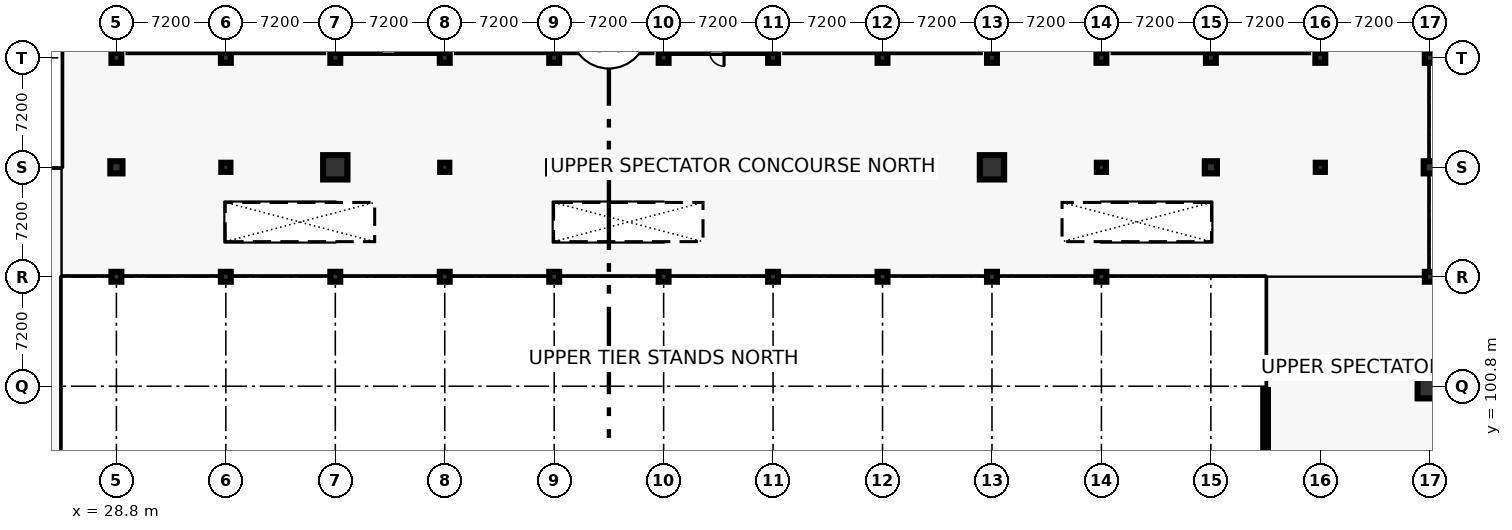
"""IFC4 building model, lengths in metres.
Left out: names, types, materials, properties, quantities, classifications, styles, units other than length and angle.
Written with IfcOpenShell. Run it as: python <this file> out.ifc"""

import sys

from ifc_helpers import new_model, si_unit, direction, frame, frame_2d, origin, origin_2d, place, context, subcontext, project, spatial, rectangle, circle, extrude, element, fill, save


model = new_model("IFC4")
c1 = context("Model", 3, precision=1e-05, world=origin(), true_north=direction((0.0, 1.0)))
c2 = subcontext(c1, "Body", "Model", "MODEL_VIEW")
j1 = project(units=[si_unit("LENGTHUNIT", "METRE"), si_unit("PLANEANGLEUNIT", "RADIAN")], contexts=[c1])
p1 = place(None, origin())
s1 = spatial("IfcSite", under=j1, at=p1, CompositionType="ELEMENT")
p2 = place(p1, origin())
s2 = spatial("IfcBuilding", under=s1, at=p2, CompositionType="ELEMENT")
p3 = place(p2, frame((0.0, 0.0, 13.8)))
s3 = spatial("IfcBuildingStorey", under=s2, at=p3, CompositionType="ELEMENT", Elevation=13.8)
p4 = place(p3, frame((28.8, 108.0, 0.0), z_axis=(0.0, 0.0, 1.0), x_axis=(1.0, 0.0, 0.0)))
e1 = element("IfcColumn", 1, at=p4, inside=s3, PredefinedType="COLUMN", context=c2, shape_type="SweptSolid", body=[
    extrude(rectangle(XDim=0.65, YDim=0.65, at=origin_2d()), origin(), (0.0, 0.0, 1.0), 4.8),
])
p5 = place(p3, frame((28.8, 115.2, 0.0), z_axis=(0.0, 0.0, 1.0), x_axis=(1.0, 0.0, 0.0)))
e2 = element("IfcColumn", 2, at=p5, inside=s3, PredefinedType="COLUMN", context=c2, shape_type="SweptSolid", body=[
    extrude(circle(Radius=0.4, at=origin_2d()), origin(), (0.0, 0.0, 1.0), 4.8),
])
for number, where, z_axis, x_axis in (
    (3, (28.8, 122.4, 0.0), (0.0, 0.0, 1.0), (1.0, 0.0, 0.0)),
    (4, (36.0, 108.0, 0.0), (0.0, 0.0, 1.0), (1.0, 0.0, 0.0)),
):
    element("IfcColumn", number, at=place(p3, frame(where, z_axis=z_axis, x_axis=x_axis)), inside=s3, PredefinedType="COLUMN", context=c2, shape_type="SweptSolid", body=[
        extrude(rectangle(XDim=0.65, YDim=0.65, at=origin_2d()), origin(), (0.0, 0.0, 1.0), 4.8),
    ])
p6 = place(p3, frame((36.0, 115.2, 0.0), z_axis=(0.0, 0.0, 1.0), x_axis=(1.0, 0.0, 0.0)))
e5 = element("IfcColumn", 5, at=p6, inside=s3, PredefinedType="COLUMN", context=c2, shape_type="SweptSolid", body=[
    extrude(rectangle(XDim=0.6, YDim=0.6, at=origin_2d()), origin(), (0.0, 0.0, 1.0), 4.8),
])
for number, where, z_axis, x_axis in (
    (6, (36.0, 122.4, 0.0), (0.0, 0.0, 1.0), (1.0, 0.0, 0.0)),
    (7, (43.2, 108.0, 0.0), (0.0, 0.0, 1.0), (1.0, 0.0, 0.0)),
):
    element("IfcColumn", number, at=place(p3, frame(where, z_axis=z_axis, x_axis=x_axis)), inside=s3, PredefinedType="COLUMN", context=c2, shape_type="SweptSolid", body=[
        extrude(rectangle(XDim=0.65, YDim=0.65, at=origin_2d()), origin(), (0.0, 0.0, 1.0), 4.8),
    ])
p7 = place(p3, frame((43.2, 115.2, 0.0), z_axis=(0.0, 0.0, 1.0), x_axis=(1.0, 0.0, 0.0)))
e8 = element("IfcColumn", 8, at=p7, inside=s3, PredefinedType="COLUMN", context=c2, shape_type="SweptSolid", body=[
    extrude(circle(Radius=0.8, at=origin_2d()), origin(), (0.0, 0.0, 1.0), 4.8),
])
for number, where, z_axis, x_axis in (
    (9, (43.2, 122.4, 0.0), (0.0, 0.0, 1.0), (1.0, 0.0, 0.0)),
    (10, (50.4, 108.0, 0.0), (0.0, 0.0, 1.0), (1.0, 0.0, 0.0)),
):
    element("IfcColumn", number, at=place(p3, frame(where, z_axis=z_axis, x_axis=x_axis)), inside=s3, PredefinedType="COLUMN", context=c2, shape_type="SweptSolid", body=[
        extrude(rectangle(XDim=0.65, YDim=0.65, at=origin_2d()), origin(), (0.0, 0.0, 1.0), 4.8),
    ])
p8 = place(p3, frame((50.4, 115.2, 0.0), z_axis=(0.0, 0.0, 1.0), x_axis=(1.0, 0.0, 0.0)))
e11 = element("IfcColumn", 11, at=p8, inside=s3, PredefinedType="COLUMN", context=c2, shape_type="SweptSolid", body=[
    extrude(rectangle(XDim=0.6, YDim=0.6, at=origin_2d()), origin(), (0.0, 0.0, 1.0), 4.8),
])
for number, where, z_axis, x_axis in (
    (12, (50.4, 122.4, 0.0), (0.0, 0.0, 1.0), (1.0, 0.0, 0.0)),
    (13, (57.6, 108.0, 0.0), (0.0, 0.0, 1.0), (1.0, 0.0, 0.0)),
):
    element("IfcColumn", number, at=place(p3, frame(where, z_axis=z_axis, x_axis=x_axis)), inside=s3, PredefinedType="COLUMN", context=c2, shape_type="SweptSolid", body=[
        extrude(rectangle(XDim=0.65, YDim=0.65, at=origin_2d()), origin(), (0.0, 0.0, 1.0), 4.8),
    ])
p9 = place(p3, frame((57.6, 115.2, 0.0), z_axis=(0.0, 0.0, 1.0), x_axis=(1.0, 0.0, 0.0)))
e14 = element("IfcColumn", 14, at=p9, inside=s3, PredefinedType="COLUMN", context=c2, shape_type="SweptSolid", body=[
    extrude(circle(Radius=0.4, at=origin_2d()), origin(), (0.0, 0.0, 1.0), 4.8),
])
for number, where, z_axis, x_axis in (
    (15, (57.6, 122.4, 0.0), (0.0, 0.0, 1.0), (1.0, 0.0, 0.0)),
    (16, (64.8, 108.0, 0.0), (0.0, 0.0, 1.0), (1.0, 0.0, 0.0)),
):
    element("IfcColumn", number, at=place(p3, frame(where, z_axis=z_axis, x_axis=x_axis)), inside=s3, PredefinedType="COLUMN", context=c2, shape_type="SweptSolid", body=[
        extrude(rectangle(XDim=0.65, YDim=0.65, at=origin_2d()), origin(), (0.0, 0.0, 1.0), 4.8),
    ])
p10 = place(p3, frame((64.8, 115.2, 0.0), z_axis=(0.0, 0.0, 1.0), x_axis=(1.0, 0.0, 0.0)))
e17 = element("IfcColumn", 17, at=p10, inside=s3, PredefinedType="COLUMN", context=c2, shape_type="SweptSolid", body=[
    extrude(rectangle(XDim=0.6, YDim=0.6, at=origin_2d()), origin(), (0.0, 0.0, 1.0), 4.8),
])
for number, where, z_axis, x_axis in (
    (18, (64.8, 122.4, 0.0), (0.0, 0.0, 1.0), (1.0, 0.0, 0.0)),
    (19, (72.0, 108.0, 0.0), (0.0, 0.0, 1.0), (1.0, 0.0, 0.0)),
):
    element("IfcColumn", number, at=place(p3, frame(where, z_axis=z_axis, x_axis=x_axis)), inside=s3, PredefinedType="COLUMN", context=c2, shape_type="SweptSolid", body=[
        extrude(rectangle(XDim=0.65, YDim=0.65, at=origin_2d()), origin(), (0.0, 0.0, 1.0), 4.8),
    ])
p11 = place(p3, frame((72.0, 115.2, 0.0), z_axis=(0.0, 0.0, 1.0), x_axis=(1.0, 0.0, 0.0)))
e20 = element("IfcColumn", 20, at=p11, inside=s3, PredefinedType="COLUMN", context=c2, shape_type="SweptSolid", body=[
    extrude(circle(Radius=0.4, at=origin_2d()), origin(), (0.0, 0.0, 1.0), 4.8),
])
for number, where, z_axis, x_axis in (
    (21, (72.0, 122.4, 0.0), (0.0, 0.0, 1.0), (1.0, 0.0, 0.0)),
    (22, (79.2, 108.0, 0.0), (0.0, 0.0, 1.0), (1.0, 0.0, 0.0)),
):
    element("IfcColumn", number, at=place(p3, frame(where, z_axis=z_axis, x_axis=x_axis)), inside=s3, PredefinedType="COLUMN", context=c2, shape_type="SweptSolid", body=[
        extrude(rectangle(XDim=0.65, YDim=0.65, at=origin_2d()), origin(), (0.0, 0.0, 1.0), 4.8),
    ])
p12 = place(p3, frame((79.2, 115.2, 0.0), z_axis=(0.0, 0.0, 1.0), x_axis=(1.0, 0.0, 0.0)))
e23 = element("IfcColumn", 23, at=p12, inside=s3, PredefinedType="COLUMN", context=c2, shape_type="SweptSolid", body=[
    extrude(rectangle(XDim=0.6, YDim=0.6, at=origin_2d()), origin(), (0.0, 0.0, 1.0), 4.8),
])
for number, where, z_axis, x_axis in (
    (24, (79.2, 122.4, 0.0), (0.0, 0.0, 1.0), (1.0, 0.0, 0.0)),
    (25, (86.4, 108.0, 0.0), (0.0, 0.0, 1.0), (1.0, 0.0, 0.0)),
):
    element("IfcColumn", number, at=place(p3, frame(where, z_axis=z_axis, x_axis=x_axis)), inside=s3, PredefinedType="COLUMN", context=c2, shape_type="SweptSolid", body=[
        extrude(rectangle(XDim=0.65, YDim=0.65, at=origin_2d()), origin(), (0.0, 0.0, 1.0), 4.8),
    ])
p13 = place(p3, frame((86.4, 115.2, 0.0), z_axis=(0.0, 0.0, 1.0), x_axis=(1.0, 0.0, 0.0)))
e26 = element("IfcColumn", 26, at=p13, inside=s3, PredefinedType="COLUMN", context=c2, shape_type="SweptSolid", body=[
    extrude(circle(Radius=0.8, at=origin_2d()), origin(), (0.0, 0.0, 1.0), 4.8),
])
for number, where, z_axis, x_axis in (
    (27, (86.4, 122.4, 0.0), (0.0, 0.0, 1.0), (1.0, 0.0, 0.0)),
    (28, (93.6, 108.0, 0.0), (0.0, 0.0, 1.0), (1.0, 0.0, 0.0)),
):
    element("IfcColumn", number, at=place(p3, frame(where, z_axis=z_axis, x_axis=x_axis)), inside=s3, PredefinedType="COLUMN", context=c2, shape_type="SweptSolid", body=[
        extrude(rectangle(XDim=0.65, YDim=0.65, at=origin_2d()), origin(), (0.0, 0.0, 1.0), 4.8),
    ])
p14 = place(p3, frame((93.6, 115.2, 0.0), z_axis=(0.0, 0.0, 1.0), x_axis=(1.0, 0.0, 0.0)))
e29 = element("IfcColumn", 29, at=p14, inside=s3, PredefinedType="COLUMN", context=c2, shape_type="SweptSolid", body=[
    extrude(rectangle(XDim=0.6, YDim=0.6, at=origin_2d()), origin(), (0.0, 0.0, 1.0), 4.8),
])
p15 = place(p3, frame((93.6, 122.4, 0.0), z_axis=(0.0, 0.0, 1.0), x_axis=(1.0, 0.0, 0.0)))
e30 = element("IfcColumn", 30, at=p15, inside=s3, PredefinedType="COLUMN", context=c2, shape_type="SweptSolid", body=[
    extrude(rectangle(XDim=0.65, YDim=0.65, at=origin_2d()), origin(), (0.0, 0.0, 1.0), 4.8),
])
p16 = place(p3, frame((100.8, 115.2, 0.0), z_axis=(0.0, 0.0, 1.0), x_axis=(1.0, 0.0, 0.0)))
e31 = element("IfcColumn", 31, at=p16, inside=s3, PredefinedType="COLUMN", context=c2, shape_type="SweptSolid", body=[
    extrude(circle(Radius=0.4, at=origin_2d()), origin(), (0.0, 0.0, 1.0), 4.8),
])
p17 = place(p3, frame((100.8, 122.4, 0.0), z_axis=(0.0, 0.0, 1.0), x_axis=(1.0, 0.0, 0.0)))
e32 = element("IfcColumn", 32, at=p17, inside=s3, PredefinedType="COLUMN", context=c2, shape_type="SweptSolid", body=[
    extrude(rectangle(XDim=0.65, YDim=0.65, at=origin_2d()), origin(), (0.0, 0.0, 1.0), 4.8),
])
p18 = place(p3, frame((108.0, 115.2, 0.0), z_axis=(0.0, 0.0, 1.0), x_axis=(1.0, 0.0, 0.0)))
e33 = element("IfcColumn", 33, at=p18, inside=s3, PredefinedType="COLUMN", context=c2, shape_type="SweptSolid", body=[
    extrude(rectangle(XDim=0.6, YDim=0.6, at=origin_2d()), origin(), (0.0, 0.0, 1.0), 4.8),
])
p19 = place(p3, frame((108.0, 122.4, 0.0), z_axis=(0.0, 0.0, 1.0), x_axis=(1.0, 0.0, 0.0)))
e34 = element("IfcColumn", 34, at=p19, inside=s3, PredefinedType="COLUMN", context=c2, shape_type="SweptSolid", body=[
    extrude(rectangle(XDim=0.65, YDim=0.65, at=origin_2d()), origin(), (0.0, 0.0, 1.0), 4.8),
])
p20 = place(p3, frame((115.2, 100.8, 0.0), z_axis=(0.0, 0.0, 1.0), x_axis=(1.0, 0.0, 0.0)))
e35 = element("IfcColumn", 35, at=p20, inside=s3, PredefinedType="COLUMN", context=c2, shape_type="SweptSolid", body=[
    extrude(circle(Radius=0.8, at=origin_2d()), origin(), (0.0, 0.0, 1.0), 4.8),
])
p21 = place(p3, frame((115.2, 108.0, 0.0), z_axis=(0.0, 0.0, 1.0), x_axis=(1.0, 0.0, 0.0)))
e36 = element("IfcColumn", 36, at=p21, inside=s3, PredefinedType="COLUMN", context=c2, shape_type="SweptSolid", body=[
    extrude(rectangle(XDim=0.65, YDim=0.65, at=origin_2d()), origin(), (0.0, 0.0, 1.0), 4.8),
])
p22 = place(p3, frame((115.2, 115.2, 0.0), z_axis=(0.0, 0.0, 1.0), x_axis=(1.0, 0.0, 0.0)))
e37 = element("IfcColumn", 37, at=p22, inside=s3, PredefinedType="COLUMN", context=c2, shape_type="SweptSolid", body=[
    extrude(circle(Radius=0.4, at=origin_2d()), origin(), (0.0, 0.0, 1.0), 4.8),
])
p23 = place(p3, frame((115.2, 122.4, 0.0), z_axis=(0.0, 0.0, 1.0), x_axis=(1.0, 0.0, 0.0)))
e38 = element("IfcColumn", 38, at=p23, inside=s3, PredefinedType="COLUMN", context=c2, shape_type="SweptSolid", body=[
    extrude(rectangle(XDim=0.65, YDim=0.65, at=origin_2d()), origin(), (0.0, 0.0, 1.0), 4.8),
])
p24 = place(p3, frame((29.6, 123.0, 0.0), z_axis=(0.0, 0.0, 1.0), x_axis=(1.0, 0.0, 0.0)))
e39 = element("IfcWall", 39, at=p24, inside=s3, PredefinedType="SHEAR", context=c2, shape_type="SweptSolid", body=[
    extrude(rectangle(XDim=12.8, YDim=0.45, at=frame_2d((6.4, 0.0))), origin(), (0.0, 0.0, 1.0), 4.53),
])
p25 = place(p24, frame((0.55, 0.0, 0.0)))
e40 = element("IfcOpeningElement", 40, at=p25, cuts=e39, PredefinedType="OPENING", context=c2, shape_type="SweptSolid", body=[
    extrude(rectangle(XDim=1.2, YDim=2.25, at=frame_2d((0.6, 1.125))), frame((0.0, 0.235, 0.0), z_axis=(0.0, -1.0, 0.0), x_axis=(1.0, 0.0, 0.0)), (0.0, 0.0, 1.0), 0.47),
])
p26 = place(p24, frame((10.458, 0.0, 0.0)))
e41 = element("IfcOpeningElement", 41, at=p26, cuts=e39, PredefinedType="OPENING", context=c2, shape_type="SweptSolid", body=[
    extrude(rectangle(XDim=1.1, YDim=2.2, at=frame_2d((0.55, 1.1))), frame((0.0, 0.235, 0.0), z_axis=(0.0, -1.0, 0.0), x_axis=(1.0, 0.0, 0.0)), (0.0, 0.0, 1.0), 0.47),
])
p27 = place(p3, frame((72.8, 123.0, 0.0), z_axis=(0.0, 0.0, 1.0), x_axis=(1.0, 0.0, 0.0)))
e42 = element("IfcWall", 42, at=p27, inside=s3, PredefinedType="SHEAR", context=c2, shape_type="SweptSolid", body=[
    extrude(rectangle(XDim=12.8, YDim=0.45, at=frame_2d((6.4, 0.0))), origin(), (0.0, 0.0, 1.0), 4.53),
])
p28 = place(p27, frame((0.55, 0.0, 0.0)))
e43 = element("IfcOpeningElement", 43, at=p28, cuts=e42, PredefinedType="OPENING", context=c2, shape_type="SweptSolid", body=[
    extrude(rectangle(XDim=1.2, YDim=2.25, at=frame_2d((0.6, 1.125))), frame((0.0, 0.235, 0.0), z_axis=(0.0, -1.0, 0.0), x_axis=(1.0, 0.0, 0.0)), (0.0, 0.0, 1.0), 0.47),
])
p29 = place(p27, frame((10.458, 0.0, 0.0)))
e44 = element("IfcOpeningElement", 44, at=p29, cuts=e42, PredefinedType="OPENING", context=c2, shape_type="SweptSolid", body=[
    extrude(rectangle(XDim=1.1, YDim=2.2, at=frame_2d((0.55, 1.1))), frame((0.0, 0.235, 0.0), z_axis=(0.0, -1.0, 0.0), x_axis=(1.0, 0.0, 0.0)), (0.0, 0.0, 1.0), 0.47),
])
p30 = place(p3, frame((51.2, 123.0, 0.0), z_axis=(0.0, 0.0, 1.0), x_axis=(1.0, 0.0, 0.0)))
e45 = element("IfcWall", 45, at=p30, inside=s3, PredefinedType="SHEAR", context=c2, shape_type="SweptSolid", body=[
    extrude(rectangle(XDim=12.8, YDim=0.45, at=frame_2d((6.4, 0.0))), origin(), (0.0, 0.0, 1.0), 4.53),
])
p31 = place(p30, frame((0.55, 0.0, 0.0)))
e46 = element("IfcOpeningElement", 46, at=p31, cuts=e45, PredefinedType="OPENING", context=c2, shape_type="SweptSolid", body=[
    extrude(rectangle(XDim=1.2, YDim=2.25, at=frame_2d((0.6, 1.125))), frame((0.0, 0.235, 0.0), z_axis=(0.0, -1.0, 0.0), x_axis=(1.0, 0.0, 0.0)), (0.0, 0.0, 1.0), 0.47),
])
p32 = place(p30, frame((10.458, 0.0, 0.0)))
e47 = element("IfcOpeningElement", 47, at=p32, cuts=e45, PredefinedType="OPENING", context=c2, shape_type="SweptSolid", body=[
    extrude(rectangle(XDim=1.1, YDim=2.2, at=frame_2d((0.55, 1.1))), frame((0.0, 0.235, 0.0), z_axis=(0.0, -1.0, 0.0), x_axis=(1.0, 0.0, 0.0)), (0.0, 0.0, 1.0), 0.47),
])
p33 = place(p3, frame((94.4, 123.0, 0.0), z_axis=(0.0, 0.0, 1.0), x_axis=(1.0, 0.0, 0.0)))
e48 = element("IfcWall", 48, at=p33, inside=s3, PredefinedType="SHEAR", context=c2, shape_type="SweptSolid", body=[
    extrude(rectangle(XDim=12.8, YDim=0.45, at=frame_2d((6.4, 0.0))), origin(), (0.0, 0.0, 1.0), 4.53),
])
p34 = place(p33, frame((0.55, 0.0, 0.0)))
e49 = element("IfcOpeningElement", 49, at=p34, cuts=e48, PredefinedType="OPENING", context=c2, shape_type="SweptSolid", body=[
    extrude(rectangle(XDim=1.2, YDim=2.25, at=frame_2d((0.6, 1.125))), frame((0.0, 0.235, 0.0), z_axis=(0.0, -1.0, 0.0), x_axis=(1.0, 0.0, 0.0)), (0.0, 0.0, 1.0), 0.47),
])
p35 = place(p33, frame((10.108, 0.0, 0.0)))
e50 = element("IfcOpeningElement", 50, at=p35, cuts=e48, PredefinedType="OPENING", context=c2, shape_type="SweptSolid", body=[
    extrude(rectangle(XDim=1.8, YDim=2.4, at=frame_2d((0.9, 1.2))), frame((0.0, 0.235, 0.0), z_axis=(0.0, -1.0, 0.0), x_axis=(1.0, 0.0, 0.0)), (0.0, 0.0, 1.0), 0.47),
])
p36 = place(p3, frame((104.4, 93.85, 0.0), z_axis=(0.0, 0.0, 1.0), x_axis=(0.0, 1.0, 0.0)))
e51 = element("IfcWall", 51, at=p36, inside=s3, PredefinedType="SOLIDWALL", context=c2, shape_type="SweptSolid", body=[
    extrude(rectangle(XDim=6.7, YDim=0.31, at=frame_2d((3.35, 0.0))), origin(), (0.0, 0.0, 1.0), 3.59),
])
p37 = place(p36, frame((2.0, 0.0, 0.9)))
e52 = element("IfcOpeningElement", 52, at=p37, cuts=e51, PredefinedType="OPENING", context=c2, shape_type="SweptSolid", body=[
    extrude(rectangle(XDim=2.7, YDim=1.2, at=frame_2d((1.35, 0.6))), frame((0.0, 0.165, 0.0), z_axis=(0.0, -1.0, 0.0), x_axis=(1.0, 0.0, 0.0)), (0.0, 0.0, 1.0), 0.33),
])
p38 = place(p3, frame((43.6, 122.8, 0.0), z_axis=(0.0, 0.0, 1.0), x_axis=(1.0, 0.0, 0.0)))
e53 = element("IfcWall", 53, at=p38, inside=s3, PredefinedType="PARTITIONING", context=c2, shape_type="SweptSolid", body=[
    extrude(rectangle(XDim=6.2, YDim=0.15, at=frame_2d((3.1, 0.0))), origin(), (0.0, 0.0, 1.0), 3.59),
])
p39 = place(p38, frame((2.625, 0.0, 0.0)))
e54 = element("IfcOpeningElement", 54, at=p39, cuts=e53, PredefinedType="OPENING", context=c2, shape_type="SweptSolid", body=[
    extrude(rectangle(XDim=0.95, YDim=2.15, at=frame_2d((0.475, 1.075))), frame((0.0, 0.085, 0.0), z_axis=(0.0, -1.0, 0.0), x_axis=(1.0, 0.0, 0.0)), (0.0, 0.0, 1.0), 0.17),
])
p40 = place(p3, frame((49.8, 122.8, 0.0), z_axis=(0.0, 0.0, 1.0), x_axis=(0.0, 1.0, 0.0)))
e55 = element("IfcWall", 55, at=p40, inside=s3, PredefinedType="PARTITIONING", context=c2, shape_type="SweptSolid", body=[
    extrude(rectangle(XDim=5.6, YDim=0.15, at=frame_2d((2.8, 0.0))), origin(), (0.0, 0.0, 1.0), 3.59),
])
p41 = place(p3, frame((65.2, 122.8, 0.0), z_axis=(0.0, 0.0, 1.0), x_axis=(1.0, 0.0, 0.0)))
e56 = element("IfcWall", 56, at=p41, inside=s3, PredefinedType="PARTITIONING", context=c2, shape_type="SweptSolid", body=[
    extrude(rectangle(XDim=6.2, YDim=0.15, at=frame_2d((3.1, 0.0))), origin(), (0.0, 0.0, 1.0), 3.59),
])
p42 = place(p41, frame((2.625, 0.0, 0.0)))
e57 = element("IfcOpeningElement", 57, at=p42, cuts=e56, PredefinedType="OPENING", context=c2, shape_type="SweptSolid", body=[
    extrude(rectangle(XDim=0.95, YDim=2.15, at=frame_2d((0.475, 1.075))), frame((0.0, 0.085, 0.0), z_axis=(0.0, -1.0, 0.0), x_axis=(1.0, 0.0, 0.0)), (0.0, 0.0, 1.0), 0.17),
])
p43 = place(p3, frame((71.4, 122.8, 0.0), z_axis=(0.0, 0.0, 1.0), x_axis=(0.0, 1.0, 0.0)))
e58 = element("IfcWall", 58, at=p43, inside=s3, PredefinedType="PARTITIONING", context=c2, shape_type="SweptSolid", body=[
    extrude(rectangle(XDim=5.6, YDim=0.15, at=frame_2d((2.8, 0.0))), origin(), (0.0, 0.0, 1.0), 3.59),
])
p44 = place(p37, origin())
e59 = element("IfcWindow", 59, at=p44, inside=s3, PartitioningType="SINGLE_PANEL", PredefinedType="WINDOW", context=c2, shape_type="SweptSolid", body=[
    extrude(rectangle(XDim=2.7, YDim=1.2, at=frame_2d((1.35, 0.6))), frame((0.0, 0.03, 0.0), z_axis=(0.0, -1.0, 0.0), x_axis=(1.0, 0.0, 0.0)), (0.0, 0.0, 1.0), 0.06),
])
fill(e52, e59)
p45 = place(p39, origin())
e60 = element("IfcDoor", 60, at=p45, inside=s3, OperationType="SINGLE_SWING_LEFT", PredefinedType="DOOR", context=c2, shape_type="SweptSolid", body=[
    extrude(rectangle(XDim=0.95, YDim=2.15, at=frame_2d((0.475, 1.075))), frame((0.0, 0.025, 0.0), z_axis=(0.0, -1.0, 0.0), x_axis=(1.0, 0.0, 0.0)), (0.0, 0.0, 1.0), 0.05),
])
fill(e54, e60)
p46 = place(p42, frame((0.95, 0.0, 0.0), z_axis=(0.0, 0.0, 1.0), x_axis=(-1.0, 0.0, 0.0)))
e61 = element("IfcDoor", 61, at=p46, inside=s3, OperationType="SINGLE_SWING_RIGHT", PredefinedType="DOOR", context=c2, shape_type="SweptSolid", body=[
    extrude(rectangle(XDim=0.95, YDim=2.15, at=frame_2d((0.475, 1.075))), frame((0.0, 0.025, 0.0), z_axis=(0.0, -1.0, 0.0), x_axis=(1.0, 0.0, 0.0)), (0.0, 0.0, 1.0), 0.05),
])
fill(e57, e61)
save(model, sys.argv[1])
